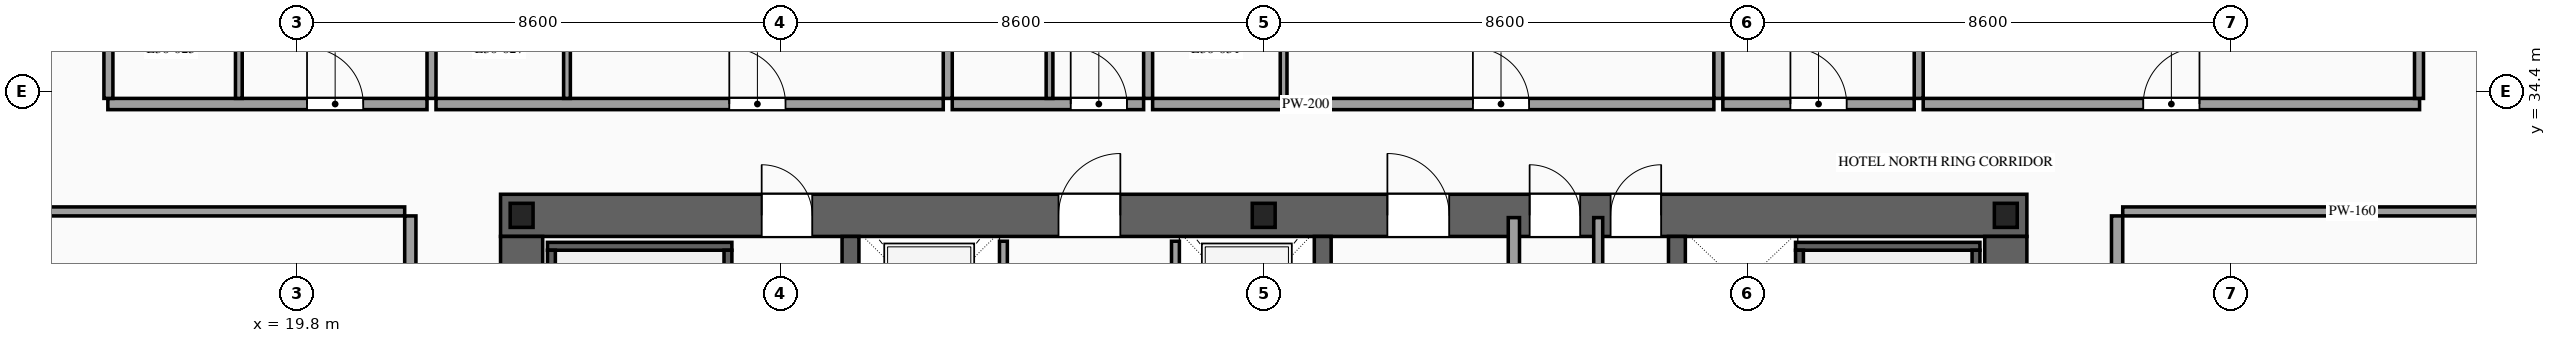
"""IFC4 building model, lengths in metres.
Left out: names, types, materials, properties, quantities, classifications, styles, units other than length and angle.
Written with IfcOpenShell. Run it as: python <this file> out.ifc"""

import sys

from ifc_helpers import new_model, si_unit, direction, frame, frame_2d, origin, origin_2d, place, context, subcontext, project, spatial, rectangle, i_section, extrude, source, transform, mapped, element, fill, save


model = new_model("IFC4")
c1 = context("Model", 3, precision=1e-05, world=origin(), true_north=direction((0.0, 1.0)))
c2 = subcontext(c1, "Body", "Model", "MODEL_VIEW")
j1 = project(units=[si_unit("LENGTHUNIT", "METRE"), si_unit("PLANEANGLEUNIT", "RADIAN")], contexts=[c1])
p1 = place(None, origin())
s1 = spatial("IfcSite", under=j1, at=p1, CompositionType="ELEMENT")
p2 = place(p1, origin())
s2 = spatial("IfcBuilding", under=s1, at=p2, CompositionType="ELEMENT")
p3 = place(p2, frame((0.0, 0.0, 115.4)))
s3 = spatial("IfcBuildingStorey", under=s2, at=p3, CompositionType="ELEMENT", Elevation=115.4)
p4 = place(p3, frame((23.425, 32.2, 0.0), z_axis=(0.0, 0.0, 1.0), x_axis=(1.0, 0.0, 0.0)))
e1 = element("IfcWall", 1, at=p4, inside=s3, PredefinedType="SHEAR", context=c2, shape_type="SweptSolid", body=[
    extrude(rectangle(XDim=27.15, YDim=0.75, at=frame_2d((13.575, 0.0))), origin(), (0.0, 0.0, 1.0), 3.6),
])
p5 = place(p4, frame((4.645, 0.0, 0.0)))
e2 = element("IfcOpeningElement", 2, at=p5, cuts=e1, PredefinedType="OPENING", context=c2, shape_type="SweptSolid", body=[
    extrude(rectangle(XDim=0.9, YDim=2.15, at=frame_2d((0.45, 1.075))), frame((0.0, 0.39, 0.0), z_axis=(0.0, -1.0, 0.0), x_axis=(1.0, 0.0, 0.0)), (0.0, 0.0, 1.0), 0.78),
])
p6 = place(p4, frame((9.925, 0.0, 0.0)))
e3 = element("IfcOpeningElement", 3, at=p6, cuts=e1, PredefinedType="OPENING", context=c2, shape_type="SweptSolid", body=[
    extrude(rectangle(XDim=1.1, YDim=2.2, at=frame_2d((0.55, 1.1))), frame((0.0, 0.39, 0.0), z_axis=(0.0, -1.0, 0.0), x_axis=(1.0, 0.0, 0.0)), (0.0, 0.0, 1.0), 0.78),
])
p7 = place(p4, frame((15.775, 0.0, 0.0)))
e4 = element("IfcOpeningElement", 4, at=p7, cuts=e1, PredefinedType="OPENING", context=c2, shape_type="SweptSolid", body=[
    extrude(rectangle(XDim=1.1, YDim=2.2, at=frame_2d((0.55, 1.1))), frame((0.0, 0.39, 0.0), z_axis=(0.0, -1.0, 0.0), x_axis=(1.0, 0.0, 0.0)), (0.0, 0.0, 1.0), 0.78),
])
p8 = place(p4, frame((18.305, 0.0, 0.0)))
e5 = element("IfcOpeningElement", 5, at=p8, cuts=e1, PredefinedType="OPENING", context=c2, shape_type="SweptSolid", body=[
    extrude(rectangle(XDim=0.9, YDim=2.15, at=frame_2d((0.45, 1.075))), frame((0.0, 0.39, 0.0), z_axis=(0.0, -1.0, 0.0), x_axis=(1.0, 0.0, 0.0)), (0.0, 0.0, 1.0), 0.78),
])
p9 = place(p4, frame((19.745, 0.0, 0.0)))
e6 = element("IfcOpeningElement", 6, at=p9, cuts=e1, PredefinedType="OPENING", context=c2, shape_type="SweptSolid", body=[
    extrude(rectangle(XDim=0.9, YDim=2.15, at=frame_2d((0.45, 1.075))), frame((0.0, 0.39, 0.0), z_axis=(0.0, -1.0, 0.0), x_axis=(1.0, 0.0, 0.0)), (0.0, 0.0, 1.0), 0.78),
])
m1 = source(origin(), c2, "Body", "SweptSolid", [
    extrude(rectangle(XDim=12.05, YDim=0.75, at=frame_2d((6.025, 0.0))), origin(), (0.0, 0.0, 1.0), 3.6),
])
for number, where, z_axis, x_axis in (
    (7, (23.8, 19.775, 0.0), (0.0, 0.0, 1.0), (0.0, 1.0, 0.0)),
    (8, (50.2, 19.775, 0.0), (0.0, 0.0, 1.0), (0.0, 1.0, 0.0)),
):
    element("IfcWall", number, at=place(p3, frame(where, z_axis=z_axis, x_axis=x_axis)), inside=s3, PredefinedType="SHEAR", context=c2, shape_type="MappedRepresentation", body=[
        mapped(m1, transform((0.0, 0.0, 0.0), scale=1.0)),
    ])
m2 = source(origin(), c2, "Body", "SweptSolid", [
    extrude(rectangle(XDim=12.05, YDim=0.3, at=frame_2d((6.025, 0.0))), origin(), (0.0, 0.0, 1.0), 3.6),
])
for number, where, z_axis, x_axis in (
    (9, (29.65, 19.775, 0.0), (0.0, 0.0, 1.0), (0.0, 1.0, 0.0)),
    (10, (38.05, 19.775, 0.0), (0.0, 0.0, 1.0), (0.0, 1.0, 0.0)),
    (11, (44.35, 19.775, 0.0), (0.0, 0.0, 1.0), (0.0, 1.0, 0.0)),
):
    element("IfcWall", number, at=place(p3, frame(where, z_axis=z_axis, x_axis=x_axis)), inside=s3, PredefinedType="SOLIDWALL", context=c2, shape_type="MappedRepresentation", body=[
        mapped(m2, transform((0.0, 0.0, 0.0), scale=1.0)),
    ])
m3 = source(origin(), c2, "Body", "SweptSolid", [
    extrude(i_section(OverallWidth=0.407, OverallDepth=0.428, WebThickness=0.02, FlangeThickness=0.035, at=origin_2d()), origin(), (0.0, 0.0, 1.0), 3.6),
])
for number, where, z_axis, x_axis in (
    (12, (23.8, 32.2, 0.0), (0.0, 0.0, 1.0), (1.0, 0.0, 0.0)),
    (13, (37.0, 32.2, 0.0), (0.0, 0.0, 1.0), (1.0, 0.0, 0.0)),
    (14, (50.2, 32.2, 0.0), (0.0, 0.0, 1.0), (1.0, 0.0, 0.0)),
):
    element("IfcColumn", number, at=place(p3, frame(where, z_axis=z_axis, x_axis=x_axis)), inside=s3, PredefinedType="COLUMN", context=c2, shape_type="MappedRepresentation", body=[
        mapped(m3, transform((0.0, 0.0, 0.0), scale=1.0)),
    ])
p10 = place(p3, frame((32.37, 29.4, 0.0), z_axis=(0.0, 0.0, 1.0), x_axis=(0.0, 1.0, 0.0)))
e15 = element("IfcWall", 15, at=p10, inside=s3, PredefinedType="SOLIDWALL", context=c2, shape_type="SweptSolid", body=[
    extrude(rectangle(XDim=2.34, YDim=0.14, at=frame_2d((1.17, 0.0))), origin(), (0.0, 0.0, 1.0), 3.38),
])
p11 = place(p10, frame((0.62, 0.0, 0.0)))
e16 = element("IfcOpeningElement", 16, at=p11, cuts=e15, PredefinedType="OPENING", context=c2, shape_type="SweptSolid", body=[
    extrude(rectangle(XDim=1.1, YDim=2.2, at=frame_2d((0.55, 1.1))), frame((0.0, 0.085, 0.0), z_axis=(0.0, -1.0, 0.0), x_axis=(1.0, 0.0, 0.0)), (0.0, 0.0, 1.0), 0.17),
])
p12 = place(p3, frame((35.43, 29.4, 0.0), z_axis=(0.0, 0.0, 1.0), x_axis=(0.0, 1.0, 0.0)))
e17 = element("IfcWall", 17, at=p12, inside=s3, PredefinedType="SOLIDWALL", context=c2, shape_type="SweptSolid", body=[
    extrude(rectangle(XDim=2.34, YDim=0.14, at=frame_2d((1.17, 0.0))), origin(), (0.0, 0.0, 1.0), 3.38),
])
p13 = place(p12, frame((0.62, 0.0, 0.0)))
e18 = element("IfcOpeningElement", 18, at=p13, cuts=e17, PredefinedType="OPENING", context=c2, shape_type="SweptSolid", body=[
    extrude(rectangle(XDim=1.1, YDim=2.2, at=frame_2d((0.55, 1.1))), frame((0.0, 0.085, 0.0), z_axis=(0.0, -1.0, 0.0), x_axis=(1.0, 0.0, 0.0)), (0.0, 0.0, 1.0), 0.17),
])
m4 = source(origin(), c2, "Body", "SweptSolid", [
    extrude(rectangle(XDim=3.28, YDim=0.14, at=frame_2d((1.64, 0.0))), origin(), (0.0, 0.0, 1.0), 3.38),
])
p14 = place(p3, frame((24.26, 31.65, 0.0), z_axis=(0.0, 0.0, 1.0), x_axis=(1.0, 0.0, 0.0)))
e19 = element("IfcWall", 19, at=p14, inside=s3, PredefinedType="SOLIDWALL", context=c2, shape_type="MappedRepresentation", body=[
    mapped(m4, transform((0.0, 0.0, 0.0), scale=1.0)),
])
m5 = source(origin(), c2, "Body", "SweptSolid", [
    extrude(rectangle(XDim=8.94, YDim=0.14, at=frame_2d((4.47, 0.0))), origin(), (0.0, 0.0, 1.0), 3.38),
])
for number, where, z_axis, x_axis in (
    (20, (24.33, 22.64, 0.0), (0.0, 0.0, 1.0), (0.0, 1.0, 0.0)),
    (21, (27.47, 22.64, 0.0), (0.0, 0.0, 1.0), (0.0, 1.0, 0.0)),
):
    element("IfcWall", number, at=place(p3, frame(where, z_axis=z_axis, x_axis=x_axis)), inside=s3, PredefinedType="SOLIDWALL", context=c2, shape_type="MappedRepresentation", body=[
        mapped(m5, transform((0.0, 0.0, 0.0), scale=1.0)),
    ])
p15 = place(p3, frame((46.46, 31.65, 0.0), z_axis=(0.0, 0.0, 1.0), x_axis=(1.0, 0.0, 0.0)))
e22 = element("IfcWall", 22, at=p15, inside=s3, PredefinedType="SOLIDWALL", context=c2, shape_type="MappedRepresentation", body=[
    mapped(m4, transform((0.0, 0.0, 0.0), scale=1.0)),
])
for number, where, z_axis, x_axis in (
    (23, (46.53, 22.64, 0.0), (0.0, 0.0, 1.0), (0.0, 1.0, 0.0)),
    (24, (49.67, 22.64, 0.0), (0.0, 0.0, 1.0), (0.0, 1.0, 0.0)),
):
    element("IfcWall", number, at=place(p3, frame(where, z_axis=z_axis, x_axis=x_axis)), inside=s3, PredefinedType="SOLIDWALL", context=c2, shape_type="MappedRepresentation", body=[
        mapped(m5, transform((0.0, 0.0, 0.0), scale=1.0)),
    ])
m6 = source(origin(), c2, "Body", "SweptSolid", [
    extrude(rectangle(XDim=5.96, YDim=0.2, at=frame_2d((2.98, 0.0))), origin(), (0.0, 0.0, 1.0), 3.38),
])
p16 = place(p3, frame((41.45, 26.2, 0.0), z_axis=(0.0, 0.0, 1.0), x_axis=(0.0, 1.0, 0.0)))
e25 = element("IfcWall", 25, at=p16, inside=s3, PredefinedType="PARTITIONING", context=c2, shape_type="MappedRepresentation", body=[
    mapped(m6, transform((0.0, 0.0, 0.0), scale=1.0)),
])
m7 = source(origin(), c2, "Body", "SweptSolid", [
    extrude(rectangle(XDim=5.96, YDim=0.16, at=frame_2d((2.98, 0.0))), origin(), (0.0, 0.0, 1.0), 3.38),
])
p17 = place(p3, frame((42.95, 26.2, 0.0), z_axis=(0.0, 0.0, 1.0), x_axis=(0.0, 1.0, 0.0)))
e26 = element("IfcWall", 26, at=p17, inside=s3, PredefinedType="PARTITIONING", context=c2, shape_type="MappedRepresentation", body=[
    mapped(m7, transform((0.0, 0.0, 0.0), scale=1.0)),
])
p18 = place(p3, frame((16.44, 34.18, 0.0), z_axis=(0.0, 0.0, 1.0), x_axis=(1.0, 0.0, 0.0)))
e27 = element("IfcWall", 27, at=p18, inside=s3, PredefinedType="PARTITIONING", context=c2, shape_type="SweptSolid", body=[
    extrude(rectangle(XDim=5.677, YDim=0.2, at=frame_2d((2.838, 0.0))), origin(), (0.0, 0.0, 1.0), 3.38),
])
p19 = place(p18, frame((3.543, 0.0, 0.0)))
e28 = element("IfcOpeningElement", 28, at=p19, cuts=e27, PredefinedType="OPENING", context=c2, shape_type="SweptSolid", body=[
    extrude(rectangle(XDim=1.0, YDim=2.2, at=frame_2d((0.5, 1.1))), frame((0.0, 0.115, 0.0), z_axis=(0.0, -1.0, 0.0), x_axis=(1.0, 0.0, 0.0)), (0.0, 0.0, 1.0), 0.23),
])
m8 = source(origin(), c2, "Body", "SweptSolid", [
    extrude(rectangle(XDim=14.97, YDim=0.16, at=frame_2d((7.485, 0.0))), origin(), (0.0, 0.0, 1.0), 3.38),
])
p20 = place(p3, frame((22.197, 34.28, 0.0), z_axis=(0.0, 0.0, 1.0), x_axis=(0.0, 1.0, 0.0)))
e29 = element("IfcWall", 29, at=p20, inside=s3, PredefinedType="PARTITIONING", context=c2, shape_type="MappedRepresentation", body=[
    mapped(m8, transform((0.0, 0.0, 0.0), scale=1.0)),
])
m9 = source(origin(), c2, "Body", "SweptSolid", [
    extrude(rectangle(XDim=2.42, YDim=0.12, at=frame_2d((1.21, 0.0))), origin(), (0.0, 0.0, 1.0), 3.38),
])
p21 = place(p3, frame((18.77, 34.28, 0.0), z_axis=(0.0, 0.0, 1.0), x_axis=(0.0, 1.0, 0.0)))
e30 = element("IfcWall", 30, at=p21, inside=s3, PredefinedType="PARTITIONING", context=c2, shape_type="MappedRepresentation", body=[
    mapped(m9, transform((0.0, 0.0, 0.0), scale=1.0)),
])
p22 = place(p3, frame((22.277, 34.18, 0.0), z_axis=(0.0, 0.0, 1.0), x_axis=(1.0, 0.0, 0.0)))
e31 = element("IfcWall", 31, at=p22, inside=s3, PredefinedType="PARTITIONING", context=c2, shape_type="SweptSolid", body=[
    extrude(rectangle(XDim=9.023, YDim=0.2, at=frame_2d((4.511, 0.0))), origin(), (0.0, 0.0, 1.0), 3.38),
])
p23 = place(p22, frame((5.217, 0.0, 0.0)))
e32 = element("IfcOpeningElement", 32, at=p23, cuts=e31, PredefinedType="OPENING", context=c2, shape_type="SweptSolid", body=[
    extrude(rectangle(XDim=1.0, YDim=2.2, at=frame_2d((0.5, 1.1))), frame((0.0, 0.115, 0.0), z_axis=(0.0, -1.0, 0.0), x_axis=(1.0, 0.0, 0.0)), (0.0, 0.0, 1.0), 0.23),
])
p24 = place(p3, frame((31.38, 34.28, 0.0), z_axis=(0.0, 0.0, 1.0), x_axis=(0.0, 1.0, 0.0)))
e33 = element("IfcWall", 33, at=p24, inside=s3, PredefinedType="PARTITIONING", context=c2, shape_type="MappedRepresentation", body=[
    mapped(m8, transform((0.0, 0.0, 0.0), scale=1.0)),
])
p25 = place(p3, frame((24.607, 34.28, 0.0), z_axis=(0.0, 0.0, 1.0), x_axis=(0.0, 1.0, 0.0)))
e34 = element("IfcWall", 34, at=p25, inside=s3, PredefinedType="PARTITIONING", context=c2, shape_type="MappedRepresentation", body=[
    mapped(m9, transform((0.0, 0.0, 0.0), scale=1.0)),
])
p26 = place(p3, frame((31.46, 34.18, 0.0), z_axis=(0.0, 0.0, 1.0), x_axis=(1.0, 0.0, 0.0)))
e35 = element("IfcWall", 35, at=p26, inside=s3, PredefinedType="PARTITIONING", context=c2, shape_type="SweptSolid", body=[
    extrude(rectangle(XDim=3.404, YDim=0.2, at=frame_2d((1.702, 0.0))), origin(), (0.0, 0.0, 1.0), 3.38),
])
p27 = place(p26, frame((2.107, 0.0, 0.0)))
e36 = element("IfcOpeningElement", 36, at=p27, cuts=e35, PredefinedType="OPENING", context=c2, shape_type="SweptSolid", body=[
    extrude(rectangle(XDim=1.0, YDim=2.2, at=frame_2d((0.5, 1.1))), frame((0.0, 0.115, 0.0), z_axis=(0.0, -1.0, 0.0), x_axis=(1.0, 0.0, 0.0)), (0.0, 0.0, 1.0), 0.23),
])
p28 = place(p3, frame((34.944, 34.28, 0.0), z_axis=(0.0, 0.0, 1.0), x_axis=(0.0, 1.0, 0.0)))
e37 = element("IfcWall", 37, at=p28, inside=s3, PredefinedType="PARTITIONING", context=c2, shape_type="MappedRepresentation", body=[
    mapped(m8, transform((0.0, 0.0, 0.0), scale=1.0)),
])
p29 = place(p3, frame((33.19, 34.28, 0.0), z_axis=(0.0, 0.0, 1.0), x_axis=(0.0, 1.0, 0.0)))
e38 = element("IfcWall", 38, at=p29, inside=s3, PredefinedType="PARTITIONING", context=c2, shape_type="MappedRepresentation", body=[
    mapped(m9, transform((0.0, 0.0, 0.0), scale=1.0)),
])
p30 = place(p3, frame((35.024, 34.18, 0.0), z_axis=(0.0, 0.0, 1.0), x_axis=(1.0, 0.0, 0.0)))
e39 = element("IfcWall", 39, at=p30, inside=s3, PredefinedType="PARTITIONING", context=c2, shape_type="SweptSolid", body=[
    extrude(rectangle(XDim=9.983, YDim=0.2, at=frame_2d((4.992, 0.0))), origin(), (0.0, 0.0, 1.0), 3.38),
])
p31 = place(p30, frame((5.697, 0.0, 0.0)))
e40 = element("IfcOpeningElement", 40, at=p31, cuts=e39, PredefinedType="OPENING", context=c2, shape_type="SweptSolid", body=[
    extrude(rectangle(XDim=1.0, YDim=2.2, at=frame_2d((0.5, 1.1))), frame((0.0, 0.115, 0.0), z_axis=(0.0, -1.0, 0.0), x_axis=(1.0, 0.0, 0.0)), (0.0, 0.0, 1.0), 0.23),
])
p32 = place(p3, frame((45.087, 34.28, 0.0), z_axis=(0.0, 0.0, 1.0), x_axis=(0.0, 1.0, 0.0)))
e41 = element("IfcWall", 41, at=p32, inside=s3, PredefinedType="PARTITIONING", context=c2, shape_type="MappedRepresentation", body=[
    mapped(m8, transform((0.0, 0.0, 0.0), scale=1.0)),
])
p33 = place(p3, frame((37.354, 34.28, 0.0), z_axis=(0.0, 0.0, 1.0), x_axis=(0.0, 1.0, 0.0)))
e42 = element("IfcWall", 42, at=p33, inside=s3, PredefinedType="PARTITIONING", context=c2, shape_type="MappedRepresentation", body=[
    mapped(m9, transform((0.0, 0.0, 0.0), scale=1.0)),
])
p34 = place(p3, frame((45.167, 34.18, 0.0), z_axis=(0.0, 0.0, 1.0), x_axis=(1.0, 0.0, 0.0)))
e43 = element("IfcWall", 43, at=p34, inside=s3, PredefinedType="PARTITIONING", context=c2, shape_type="SweptSolid", body=[
    extrude(rectangle(XDim=3.404, YDim=0.2, at=frame_2d((1.702, 0.0))), origin(), (0.0, 0.0, 1.0), 3.38),
])
p35 = place(p34, frame((1.202, 0.0, 0.0)))
e44 = element("IfcOpeningElement", 44, at=p35, cuts=e43, PredefinedType="OPENING", context=c2, shape_type="SweptSolid", body=[
    extrude(rectangle(XDim=1.0, YDim=2.2, at=frame_2d((0.5, 1.1))), frame((0.0, 0.115, 0.0), z_axis=(0.0, -1.0, 0.0), x_axis=(1.0, 0.0, 0.0)), (0.0, 0.0, 1.0), 0.23),
])
p36 = place(p3, frame((48.651, 34.28, 0.0), z_axis=(0.0, 0.0, 1.0), x_axis=(0.0, 1.0, 0.0)))
e45 = element("IfcWall", 45, at=p36, inside=s3, PredefinedType="PARTITIONING", context=c2, shape_type="MappedRepresentation", body=[
    mapped(m8, transform((0.0, 0.0, 0.0), scale=1.0)),
])
p37 = place(p3, frame((48.731, 34.18, 0.0), z_axis=(0.0, 0.0, 1.0), x_axis=(1.0, 0.0, 0.0)))
e46 = element("IfcWall", 46, at=p37, inside=s3, PredefinedType="PARTITIONING", context=c2, shape_type="SweptSolid", body=[
    extrude(rectangle(XDim=8.829, YDim=0.2, at=frame_2d((4.415, 0.0))), origin(), (0.0, 0.0, 1.0), 3.38),
])
p38 = place(p37, frame((3.914, 0.0, 0.0)))
e47 = element("IfcOpeningElement", 47, at=p38, cuts=e46, PredefinedType="OPENING", context=c2, shape_type="SweptSolid", body=[
    extrude(rectangle(XDim=1.0, YDim=2.2, at=frame_2d((0.5, 1.1))), frame((0.0, 0.115, 0.0), z_axis=(0.0, -1.0, 0.0), x_axis=(1.0, 0.0, 0.0)), (0.0, 0.0, 1.0), 0.23),
])
m10 = source(origin(), c2, "Body", "SweptSolid", [
    extrude(rectangle(XDim=14.82, YDim=0.16, at=frame_2d((7.41, 0.0))), origin(), (0.0, 0.0, 1.0), 3.38),
])
for number, where, z_axis, x_axis in (
    (48, (16.45, 34.28, 0.0), (0.0, 0.0, 1.0), (0.0, 1.0, 0.0)),
    (49, (57.55, 34.28, 0.0), (0.0, 0.0, 1.0), (0.0, 1.0, 0.0)),
):
    element("IfcWall", number, at=place(p3, frame(where, z_axis=z_axis, x_axis=x_axis)), inside=s3, PredefinedType="PARTITIONING", context=c2, shape_type="MappedRepresentation", body=[
        mapped(m10, transform((0.0, 0.0, 0.0), scale=1.0)),
    ])
p39 = place(p3, frame((21.82, 19.41, 0.0), z_axis=(0.0, 0.0, 1.0), x_axis=(0.0, 1.0, 0.0)))
e50 = element("IfcWall", 50, at=p39, inside=s3, PredefinedType="PARTITIONING", context=c2, shape_type="SweptSolid", body=[
    extrude(rectangle(XDim=12.78, YDim=0.2, at=frame_2d((6.39, 0.0))), origin(), (0.0, 0.0, 1.0), 3.38),
])
p40 = place(p39, frame((5.89, 0.0, 0.0)))
e51 = element("IfcOpeningElement", 51, at=p40, cuts=e50, PredefinedType="OPENING", context=c2, shape_type="SweptSolid", body=[
    extrude(rectangle(XDim=1.0, YDim=2.2, at=frame_2d((0.5, 1.1))), frame((0.0, 0.115, 0.0), z_axis=(0.0, -1.0, 0.0), x_axis=(1.0, 0.0, 0.0)), (0.0, 0.0, 1.0), 0.23),
])
m11 = source(origin(), c2, "Body", "SweptSolid", [
    extrude(rectangle(XDim=8.17, YDim=0.16, at=frame_2d((4.085, 0.0))), origin(), (0.0, 0.0, 1.0), 2.875),
])
p41 = place(p3, frame((13.55, 32.27, 0.0), z_axis=(0.0, 0.0, 1.0), x_axis=(1.0, 0.0, 0.0)))
e52 = element("IfcWall", 52, at=p41, inside=s3, PredefinedType="PARTITIONING", context=c2, shape_type="MappedRepresentation", body=[
    mapped(m11, transform((0.0, 0.0, 0.0), scale=1.0)),
])
p42 = place(p3, frame((52.18, 25.88, 0.0), z_axis=(0.0, 0.0, 1.0), x_axis=(0.0, 1.0, 0.0)))
e53 = element("IfcWall", 53, at=p42, inside=s3, PredefinedType="PARTITIONING", context=c2, shape_type="SweptSolid", body=[
    extrude(rectangle(XDim=6.31, YDim=0.2, at=frame_2d((3.155, 0.0))), origin(), (0.0, 0.0, 1.0), 3.38),
])
p43 = place(p42, frame((3.835, 0.0, 0.0)))
e54 = element("IfcOpeningElement", 54, at=p43, cuts=e53, PredefinedType="OPENING", context=c2, shape_type="SweptSolid", body=[
    extrude(rectangle(XDim=1.0, YDim=2.2, at=frame_2d((0.5, 1.1))), frame((0.0, 0.115, 0.0), z_axis=(0.0, -1.0, 0.0), x_axis=(1.0, 0.0, 0.0)), (0.0, 0.0, 1.0), 0.23),
])
p44 = place(p3, frame((52.28, 32.27, 0.0), z_axis=(0.0, 0.0, 1.0), x_axis=(1.0, 0.0, 0.0)))
e55 = element("IfcWall", 55, at=p44, inside=s3, PredefinedType="PARTITIONING", context=c2, shape_type="MappedRepresentation", body=[
    mapped(m11, transform((0.0, 0.0, 0.0), scale=1.0)),
])
m12 = source(origin(), c2, "Body", "SweptSolid", [
    extrude(rectangle(XDim=0.9, YDim=2.15, at=frame_2d((0.45, 1.075))), frame((0.0, 0.025, 0.0), z_axis=(0.0, -1.0, 0.0), x_axis=(1.0, 0.0, 0.0)), (0.0, 0.0, 1.0), 0.05),
])
p45 = place(p5, origin())
e56 = element("IfcDoor", 56, at=p45, inside=s3, OperationType="SINGLE_SWING_LEFT", PredefinedType="DOOR", context=c2, shape_type="MappedRepresentation", body=[
    mapped(m12, transform((0.0, 0.0, 0.0), scale=1.0)),
])
fill(e2, e56)
m13 = source(origin(), c2, "Body", "SweptSolid", [
    extrude(rectangle(XDim=1.1, YDim=2.2, at=frame_2d((0.55, 1.1))), frame((0.0, 0.025, 0.0), z_axis=(0.0, -1.0, 0.0), x_axis=(1.0, 0.0, 0.0)), (0.0, 0.0, 1.0), 0.05),
])
p46 = place(p6, origin())
e57 = element("IfcDoor", 57, at=p46, inside=s3, OperationType="SINGLE_SWING_RIGHT", PredefinedType="DOOR", context=c2, shape_type="MappedRepresentation", body=[
    mapped(m13, transform((0.0, 0.0, 0.0), scale=1.0)),
])
fill(e3, e57)
p47 = place(p7, origin())
e58 = element("IfcDoor", 58, at=p47, inside=s3, OperationType="SINGLE_SWING_LEFT", PredefinedType="DOOR", context=c2, shape_type="MappedRepresentation", body=[
    mapped(m13, transform((0.0, 0.0, 0.0), scale=1.0)),
])
fill(e4, e58)
p48 = place(p8, origin())
e59 = element("IfcDoor", 59, at=p48, inside=s3, OperationType="SINGLE_SWING_LEFT", PredefinedType="DOOR", context=c2, shape_type="MappedRepresentation", body=[
    mapped(m12, transform((0.0, 0.0, 0.0), scale=1.0)),
])
fill(e5, e59)
p49 = place(p9, origin())
e60 = element("IfcDoor", 60, at=p49, inside=s3, OperationType="SINGLE_SWING_RIGHT", PredefinedType="DOOR", context=c2, shape_type="MappedRepresentation", body=[
    mapped(m12, transform((0.0, 0.0, 0.0), scale=1.0)),
])
fill(e6, e60)
m14 = source(origin(), c2, "Body", "SweptSolid", [
    extrude(rectangle(XDim=1.0, YDim=2.2, at=frame_2d((0.5, 1.1))), frame((0.0, 0.025, 0.0), z_axis=(0.0, -1.0, 0.0), x_axis=(1.0, 0.0, 0.0)), (0.0, 0.0, 1.0), 0.05),
])
p50 = place(p19, origin())
e61 = element("IfcDoor", 61, at=p50, inside=s3, OperationType="SINGLE_SWING_LEFT", PredefinedType="DOOR", context=c2, shape_type="MappedRepresentation", body=[
    mapped(m14, transform((0.0, 0.0, 0.0), scale=1.0)),
])
fill(e28, e61)
p51 = place(p23, origin())
e62 = element("IfcDoor", 62, at=p51, inside=s3, OperationType="SINGLE_SWING_LEFT", PredefinedType="DOOR", context=c2, shape_type="MappedRepresentation", body=[
    mapped(m14, transform((0.0, 0.0, 0.0), scale=1.0)),
])
fill(e32, e62)
p52 = place(p27, origin())
e63 = element("IfcDoor", 63, at=p52, inside=s3, OperationType="SINGLE_SWING_LEFT", PredefinedType="DOOR", context=c2, shape_type="MappedRepresentation", body=[
    mapped(m14, transform((0.0, 0.0, 0.0), scale=1.0)),
])
fill(e36, e63)
p53 = place(p31, origin())
e64 = element("IfcDoor", 64, at=p53, inside=s3, OperationType="SINGLE_SWING_LEFT", PredefinedType="DOOR", context=c2, shape_type="MappedRepresentation", body=[
    mapped(m14, transform((0.0, 0.0, 0.0), scale=1.0)),
])
fill(e40, e64)
p54 = place(p35, origin())
e65 = element("IfcDoor", 65, at=p54, inside=s3, OperationType="SINGLE_SWING_LEFT", PredefinedType="DOOR", context=c2, shape_type="MappedRepresentation", body=[
    mapped(m14, transform((0.0, 0.0, 0.0), scale=1.0)),
])
fill(e44, e65)
p55 = place(p38, origin())
e66 = element("IfcDoor", 66, at=p55, inside=s3, OperationType="SINGLE_SWING_RIGHT", PredefinedType="DOOR", context=c2, shape_type="MappedRepresentation", body=[
    mapped(m14, transform((0.0, 0.0, 0.0), scale=1.0)),
])
fill(e47, e66)
save(model, sys.argv[1])
